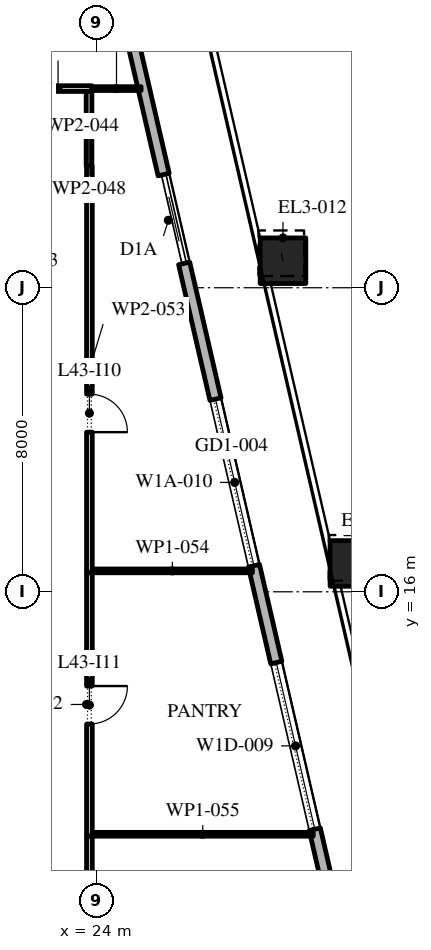
"""IFC4 building model, lengths in metres.
Left out: names, types, materials, properties, quantities, classifications, styles, units other than length and angle.
Written with IfcOpenShell. Run it as: python <this file> out.ifc"""

import sys

from ifc_helpers import new_model, si_unit, direction, frame, frame_2d, origin, origin_2d, place, context, subcontext, project, spatial, rectangle, extrude, element, fill, save


model = new_model("IFC4")
c1 = context("Model", 3, precision=1e-05, world=origin(), true_north=direction((0.0, 1.0)))
c2 = subcontext(c1, "Body", "Model", "MODEL_VIEW")
j1 = project(units=[si_unit("LENGTHUNIT", "METRE"), si_unit("PLANEANGLEUNIT", "RADIAN")], contexts=[c1])
p1 = place(None, origin())
s1 = spatial("IfcSite", under=j1, at=p1, CompositionType="ELEMENT")
p2 = place(p1, origin())
s2 = spatial("IfcBuilding", under=s1, at=p2, CompositionType="ELEMENT")
p3 = place(p2, frame((0.0, 0.0, 196.8)))
s3 = spatial("IfcBuildingStorey", under=s2, at=p3, CompositionType="ELEMENT", Elevation=196.8)
p4 = place(p3, frame((30.733, 16.746, 0.0), z_axis=(-0.008132835078, 0.035087374195, 0.999351156084), x_axis=(-0.97417327444, -0.225801752354, 0.0)))
e1 = element("IfcColumn", 1, at=p4, inside=s3, PredefinedType="COLUMN", context=c2, shape_type="SweptSolid", body=[
    extrude(rectangle(XDim=1.2, YDim=1.2, at=origin_2d()), origin(), (0.0, 0.0, 1.0), 4.203),
])
p5 = place(p3, frame((28.894, 24.711, 0.0), z_axis=(-0.010799619665, 0.046740289408, 0.998848694028), x_axis=(-0.974329962248, -0.225124686929, 0.0)))
e2 = element("IfcColumn", 2, at=p5, inside=s3, PredefinedType="COLUMN", context=c2, shape_type="SweptSolid", body=[
    extrude(rectangle(XDim=1.2, YDim=1.2, at=origin_2d()), origin(), (0.0, 0.0, 1.0), 4.205),
])
p6 = place(p3, frame((33.157, -5.092, 0.0), z_axis=(0.0, 0.0, 1.0), x_axis=(-0.224950279389, 0.974370243697, 0.0)))
e3 = element("IfcWall", 3, at=p6, inside=s3, PredefinedType="STANDARD", context=c2, shape_type="SweptSolid", body=[
    extrude(rectangle(XDim=49.5, YDim=0.3, at=frame_2d((24.75, 0.0))), origin(), (0.0, 0.0, 1.0), 4.0),
])
p7 = place(p6, frame((2.207, 0.0, 0.0)))
e4 = element("IfcOpeningElement", 4, at=p7, cuts=e3, PredefinedType="OPENING", context=c2, shape_type="SweptSolid", body=[
    extrude(rectangle(XDim=2.4, YDim=3.125, at=frame_2d((1.2, 1.562))), frame((0.0, 0.16, 0.0), z_axis=(0.0, -1.0, 0.0), x_axis=(1.0, 0.0, 0.0)), (0.0, 0.0, 1.0), 0.32),
])
p8 = place(p6, frame((8.121, 0.0, 0.45)))
e5 = element("IfcOpeningElement", 5, at=p8, cuts=e3, PredefinedType="OPENING", context=c2, shape_type="SweptSolid", body=[
    extrude(rectangle(XDim=4.5, YDim=2.875, at=frame_2d((2.25, 1.438))), frame((0.0, 0.16, 0.0), z_axis=(0.0, -1.0, 0.0), x_axis=(1.0, 0.0, 0.0)), (0.0, 0.0, 1.0), 0.32),
])
p9 = place(p6, frame((15.236, 0.0, 0.45)))
e6 = element("IfcOpeningElement", 6, at=p9, cuts=e3, PredefinedType="OPENING", context=c2, shape_type="SweptSolid", body=[
    extrude(rectangle(XDim=4.5, YDim=2.875, at=frame_2d((2.25, 1.438))), frame((0.0, 0.16, 0.0), z_axis=(0.0, -1.0, 0.0), x_axis=(1.0, 0.0, 0.0)), (0.0, 0.0, 1.0), 0.32),
])
p10 = place(p6, frame((22.35, 0.0, 0.45)))
e7 = element("IfcOpeningElement", 7, at=p10, cuts=e3, PredefinedType="OPENING", context=c2, shape_type="SweptSolid", body=[
    extrude(rectangle(XDim=4.5, YDim=3.0, at=frame_2d((2.25, 1.5))), frame((0.0, 0.16, 0.0), z_axis=(0.0, -1.0, 0.0), x_axis=(1.0, 0.0, 0.0)), (0.0, 0.0, 1.0), 0.32),
])
p11 = place(p6, frame((30.514, 0.0, 0.0)))
e8 = element("IfcOpeningElement", 8, at=p11, cuts=e3, PredefinedType="OPENING", context=c2, shape_type="SweptSolid", body=[
    extrude(rectangle(XDim=2.4, YDim=3.45, at=frame_2d((1.2, 1.725))), frame((0.0, 0.16, 0.0), z_axis=(0.0, -1.0, 0.0), x_axis=(1.0, 0.0, 0.0)), (0.0, 0.0, 1.0), 0.32),
])
p12 = place(p6, frame((36.579, 0.0, 0.45)))
e9 = element("IfcOpeningElement", 9, at=p12, cuts=e3, PredefinedType="OPENING", context=c2, shape_type="SweptSolid", body=[
    extrude(rectangle(XDim=4.5, YDim=3.05, at=frame_2d((2.25, 1.525))), frame((0.0, 0.16, 0.0), z_axis=(0.0, -1.0, 0.0), x_axis=(1.0, 0.0, 0.0)), (0.0, 0.0, 1.0), 0.32),
])
p13 = place(p6, frame((43.693, 0.0, 0.45)))
e10 = element("IfcOpeningElement", 10, at=p13, cuts=e3, PredefinedType="OPENING", context=c2, shape_type="SweptSolid", body=[
    extrude(rectangle(XDim=4.5, YDim=3.05, at=frame_2d((2.25, 1.525))), frame((0.0, 0.16, 0.0), z_axis=(0.0, -1.0, 0.0), x_axis=(1.0, 0.0, 0.0)), (0.0, 0.0, 1.0), 0.32),
])
p14 = place(p3, frame((22.085, 29.24, 0.0), z_axis=(0.0, 0.0, 1.0), x_axis=(1.0, 0.0, 0.0)))
e11 = element("IfcWall", 11, at=p14, inside=s3, PredefinedType="PARTITIONING", context=c2, shape_type="SweptSolid", body=[
    extrude(rectangle(XDim=1.78, YDim=0.15, at=frame_2d((0.89, 0.0))), origin(), (0.0, 0.0, 1.0), 4.0),
])
p15 = place(p3, frame((23.79, 29.165, 0.0), z_axis=(0.0, 0.0, 1.0), x_axis=(0.0, -1.0, 0.0)))
e12 = element("IfcWall", 12, at=p15, inside=s3, PredefinedType="PARTITIONING", context=c2, shape_type="SweptSolid", body=[
    extrude(rectangle(XDim=1.965, YDim=0.15, at=frame_2d((0.982, 0.0))), origin(), (0.0, 0.0, 1.0), 4.0),
])
p16 = place(p3, frame((23.865, 29.24, 0.0), z_axis=(0.0, 0.0, 1.0), x_axis=(1.0, 0.0, 0.0)))
e13 = element("IfcWall", 13, at=p16, inside=s3, PredefinedType="PARTITIONING", context=c2, shape_type="SweptSolid", body=[
    extrude(rectangle(XDim=1.295, YDim=0.1, at=frame_2d((0.647, 0.0))), origin(), (0.0, 0.0, 1.0), 4.0),
])
p17 = place(p3, frame((23.8, 9.57, 0.0), z_axis=(0.0, 0.0, 1.0), x_axis=(0.0, -1.0, 0.0)))
e14 = element("IfcWall", 14, at=p17, inside=s3, PredefinedType="PARTITIONING", context=c2, shape_type="SweptSolid", body=[
    extrude(rectangle(XDim=6.83, YDim=0.15, at=frame_2d((3.415, 0.0))), origin(), (0.0, 0.0, 1.0), 4.0),
])
p18 = place(p17, frame((2.98, 0.0, 0.0)))
e15 = element("IfcOpeningElement", 15, at=p18, cuts=e14, PredefinedType="OPENING", context=c2, shape_type="SweptSolid", body=[
    extrude(rectangle(XDim=1.0, YDim=2.1, at=frame_2d((0.5, 1.05))), frame((0.0, 0.085, 0.0), z_axis=(0.0, -1.0, 0.0), x_axis=(1.0, 0.0, 0.0)), (0.0, 0.0, 1.0), 0.17),
])
p19 = place(p3, frame((23.8, 16.5, 0.0), z_axis=(0.0, 0.0, 1.0), x_axis=(0.0, -1.0, 0.0)))
e16 = element("IfcWall", 16, at=p19, inside=s3, PredefinedType="PARTITIONING", context=c2, shape_type="SweptSolid", body=[
    extrude(rectangle(XDim=6.93, YDim=0.15, at=frame_2d((3.465, 0.0))), origin(), (0.0, 0.0, 1.0), 4.0),
])
p20 = place(p19, frame((2.98, 0.0, 0.0)))
e17 = element("IfcOpeningElement", 17, at=p20, cuts=e16, PredefinedType="OPENING", context=c2, shape_type="SweptSolid", body=[
    extrude(rectangle(XDim=1.0, YDim=2.1, at=frame_2d((0.5, 1.05))), frame((0.0, 0.085, 0.0), z_axis=(0.0, -1.0, 0.0), x_axis=(1.0, 0.0, 0.0)), (0.0, 0.0, 1.0), 0.17),
])
p21 = place(p3, frame((23.8, 27.2, 0.0), z_axis=(0.0, 0.0, 1.0), x_axis=(0.0, -1.0, 0.0)))
e18 = element("IfcWall", 18, at=p21, inside=s3, PredefinedType="PARTITIONING", context=c2, shape_type="SweptSolid", body=[
    extrude(rectangle(XDim=10.7, YDim=0.15, at=frame_2d((5.35, 0.0))), origin(), (0.0, 0.0, 1.0), 4.0),
])
p22 = place(p21, frame((6.0, 0.0, 0.0)))
e19 = element("IfcOpeningElement", 19, at=p22, cuts=e18, PredefinedType="OPENING", context=c2, shape_type="SweptSolid", body=[
    extrude(rectangle(XDim=1.0, YDim=2.1, at=frame_2d((0.5, 1.05))), frame((0.0, 0.085, 0.0), z_axis=(0.0, -1.0, 0.0), x_axis=(1.0, 0.0, 0.0)), (0.0, 0.0, 1.0), 0.17),
])
p23 = place(p3, frame((28.089, 16.55, 0.0), z_axis=(0.0, 0.0, 1.0), x_axis=(-1.0, 0.0, 0.0)))
e20 = element("IfcWall", 20, at=p23, inside=s3, PredefinedType="PARTITIONING", context=c2, shape_type="SweptSolid", body=[
    extrude(rectangle(XDim=4.214, YDim=0.1, at=frame_2d((2.107, 0.0))), origin(), (0.0, 0.0, 1.0), 4.0),
])
p24 = place(p3, frame((29.689, 9.62, 0.0), z_axis=(0.0, 0.0, 1.0), x_axis=(-1.0, 0.0, 0.0)))
e21 = element("IfcWall", 21, at=p24, inside=s3, PredefinedType="PARTITIONING", context=c2, shape_type="SweptSolid", body=[
    extrude(rectangle(XDim=5.814, YDim=0.1, at=frame_2d((2.907, 0.0))), origin(), (0.0, 0.0, 1.0), 4.0),
])
p25 = place(p9, origin())
e22 = element("IfcWindow", 22, at=p25, inside=s3, PartitioningType="DOUBLE_PANEL_VERTICAL", PredefinedType="WINDOW", context=c2, shape_type="SweptSolid", body=[
    extrude(rectangle(XDim=4.5, YDim=2.875, at=frame_2d((2.25, 1.438))), frame((0.0, 0.03, 0.0), z_axis=(0.0, -1.0, 0.0), x_axis=(1.0, 0.0, 0.0)), (0.0, 0.0, 1.0), 0.06),
])
fill(e6, e22)
p26 = place(p10, origin())
e23 = element("IfcWindow", 23, at=p26, inside=s3, PartitioningType="DOUBLE_PANEL_VERTICAL", PredefinedType="WINDOW", context=c2, shape_type="SweptSolid", body=[
    extrude(rectangle(XDim=4.5, YDim=3.0, at=frame_2d((2.25, 1.5))), frame((0.0, 0.03, 0.0), z_axis=(0.0, -1.0, 0.0), x_axis=(1.0, 0.0, 0.0)), (0.0, 0.0, 1.0), 0.06),
])
fill(e7, e23)
p27 = place(p11, origin())
e24 = element("IfcDoor", 24, at=p27, inside=s3, OperationType="DOUBLE_DOOR_SLIDING", PredefinedType="DOOR", context=c2, shape_type="SweptSolid", body=[
    extrude(rectangle(XDim=2.4, YDim=3.45, at=frame_2d((1.2, 1.725))), frame((0.0, 0.025, 0.0), z_axis=(0.0, -1.0, 0.0), x_axis=(1.0, 0.0, 0.0)), (0.0, 0.0, 1.0), 0.05),
])
fill(e8, e24)
p28 = place(p22, origin())
e25 = element("IfcDoor", 25, at=p28, inside=s3, OperationType="SINGLE_SWING_LEFT", PredefinedType="DOOR", context=c2, shape_type="SweptSolid", body=[
    extrude(rectangle(XDim=1.0, YDim=2.1, at=frame_2d((0.5, 1.05))), frame((0.0, 0.025, 0.0), z_axis=(0.0, -1.0, 0.0), x_axis=(1.0, 0.0, 0.0)), (0.0, 0.0, 1.0), 0.05),
])
fill(e19, e25)
p29 = place(p20, origin())
e26 = element("IfcDoor", 26, at=p29, inside=s3, OperationType="SINGLE_SWING_RIGHT", PredefinedType="DOOR", context=c2, shape_type="SweptSolid", body=[
    extrude(rectangle(XDim=1.0, YDim=2.1, at=frame_2d((0.5, 1.05))), frame((0.0, 0.025, 0.0), z_axis=(0.0, -1.0, 0.0), x_axis=(1.0, 0.0, 0.0)), (0.0, 0.0, 1.0), 0.05),
])
fill(e17, e26)
save(model, sys.argv[1])
